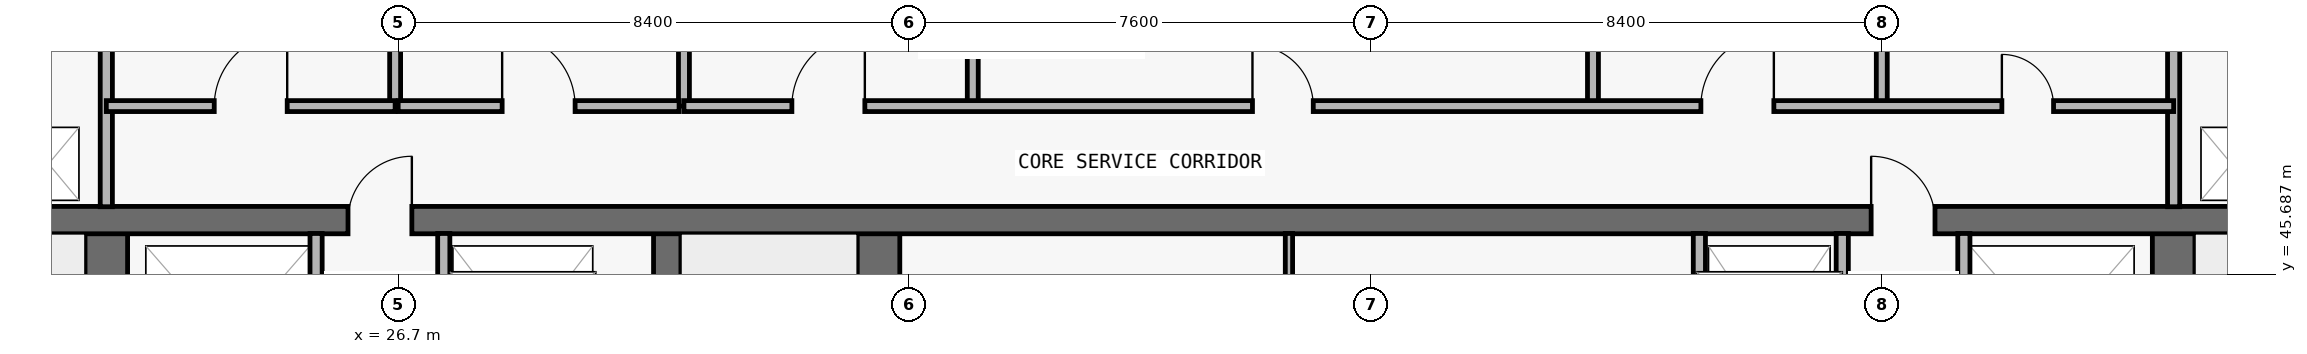
"""IFC4 building model, lengths in metres.
Left out: names, types, materials, properties, quantities, classifications, styles, units other than length and angle.
Written with IfcOpenShell. Run it as: python <this file> out.ifc"""

import sys

from ifc_helpers import new_model, si_unit, direction, frame, frame_2d, origin, place, context, subcontext, project, spatial, rectangle, extrude, element, fill, save


model = new_model("IFC4")
c1 = context("Model", 3, precision=1e-05, world=origin(), true_north=direction((0.0, 1.0)))
c2 = subcontext(c1, "Body", "Model", "MODEL_VIEW")
j1 = project(units=[si_unit("LENGTHUNIT", "METRE"), si_unit("PLANEANGLEUNIT", "RADIAN")], contexts=[c1])
p1 = place(None, origin())
s1 = spatial("IfcSite", under=j1, at=p1, CompositionType="ELEMENT")
p2 = place(p1, origin())
s2 = spatial("IfcBuilding", under=s1, at=p2, CompositionType="ELEMENT")
p3 = place(p2, frame((0.0, 0.0, 188.4)))
s3 = spatial("IfcBuildingStorey", under=s2, at=p3, CompositionType="ELEMENT", Elevation=188.4)
p4 = place(p3, frame((21.9, 37.0, 0.0), z_axis=(0.0, 0.0, 1.0), x_axis=(0.0, 1.0, 0.0)))
e1 = element("IfcWall", 1, at=p4, inside=s3, PredefinedType="SHEAR", context=c2, shape_type="SweptSolid", body=[
    extrude(rectangle(XDim=9.575, YDim=0.7, at=frame_2d((4.788, 0.0))), origin(), (0.0, 0.0, 1.0), 3.05),
])
p5 = place(p4, frame((0.55, 0.0, 0.0)))
e2 = element("IfcOpeningElement", 2, at=p5, cuts=e1, PredefinedType="OPENING", context=c2, shape_type="SweptSolid", body=[
    extrude(rectangle(XDim=1.1, YDim=2.15, at=frame_2d((0.55, 1.075))), frame((0.0, 0.36, 0.0), z_axis=(0.0, -1.0, 0.0), x_axis=(1.0, 0.0, 0.0)), (0.0, 0.0, 1.0), 0.72),
])
p6 = place(p3, frame((55.9, 37.0, 0.0), z_axis=(0.0, 0.0, 1.0), x_axis=(0.0, 1.0, 0.0)))
e3 = element("IfcWall", 3, at=p6, inside=s3, PredefinedType="SHEAR", context=c2, shape_type="SweptSolid", body=[
    extrude(rectangle(XDim=9.575, YDim=0.7, at=frame_2d((4.788, 0.0))), origin(), (0.0, 0.0, 1.0), 3.05),
])
p7 = place(p6, frame((0.55, 0.0, 0.0)))
e4 = element("IfcOpeningElement", 4, at=p7, cuts=e3, PredefinedType="OPENING", context=c2, shape_type="SweptSolid", body=[
    extrude(rectangle(XDim=1.1, YDim=2.15, at=frame_2d((0.55, 1.075))), frame((0.0, 0.36, 0.0), z_axis=(0.0, -1.0, 0.0), x_axis=(1.0, 0.0, 0.0)), (0.0, 0.0, 1.0), 0.72),
])
p8 = place(p3, frame((31.125, 37.0, 0.0), z_axis=(0.0, 0.0, 1.0), x_axis=(0.0, 1.0, 0.0)))
e5 = element("IfcWall", 5, at=p8, inside=s3, PredefinedType="SHEAR", context=c2, shape_type="SweptSolid", body=[
    extrude(rectangle(XDim=9.575, YDim=0.45, at=frame_2d((4.788, 0.0))), origin(), (0.0, 0.0, 1.0), 3.05),
])
p9 = place(p3, frame((34.6, 37.0, 0.0), z_axis=(0.0, 0.0, 1.0), x_axis=(0.0, 1.0, 0.0)))
e6 = element("IfcWall", 6, at=p9, inside=s3, PredefinedType="SHEAR", context=c2, shape_type="SweptSolid", body=[
    extrude(rectangle(XDim=9.575, YDim=0.7, at=frame_2d((4.788, 0.0))), origin(), (0.0, 0.0, 1.0), 3.05),
])
p10 = place(p3, frame((18.3, 46.575, 0.0), z_axis=(0.0, 0.0, 1.0), x_axis=(1.0, 0.0, 0.0)))
e7 = element("IfcWall", 7, at=p10, inside=s3, PredefinedType="SHEAR", context=c2, shape_type="SweptSolid", body=[
    extrude(rectangle(XDim=41.2, YDim=0.45, at=frame_2d((20.6, 0.0))), origin(), (0.0, 0.0, 1.0), 3.05),
])
p11 = place(p10, frame((7.575, 0.0, 0.0)))
e8 = element("IfcOpeningElement", 8, at=p11, cuts=e7, PredefinedType="OPENING", context=c2, shape_type="SweptSolid", body=[
    extrude(rectangle(XDim=1.05, YDim=2.15, at=frame_2d((0.525, 1.075))), frame((0.0, 0.235, 0.0), z_axis=(0.0, -1.0, 0.0), x_axis=(1.0, 0.0, 0.0)), (0.0, 0.0, 1.0), 0.47),
])
p12 = place(p10, frame((32.625, 0.0, 0.0)))
e9 = element("IfcOpeningElement", 9, at=p12, cuts=e7, PredefinedType="OPENING", context=c2, shape_type="SweptSolid", body=[
    extrude(rectangle(XDim=1.05, YDim=2.15, at=frame_2d((0.525, 1.075))), frame((0.0, 0.235, 0.0), z_axis=(0.0, -1.0, 0.0), x_axis=(1.0, 0.0, 0.0)), (0.0, 0.0, 1.0), 0.47),
])
p13 = place(p3, frame((21.9, 46.795, 0.0), z_axis=(0.0, 0.0, 1.0), x_axis=(0.0, 1.0, 0.0)))
e10 = element("IfcWall", 10, at=p13, inside=s3, PredefinedType="PARTITIONING", context=c2, shape_type="SweptSolid", body=[
    extrude(rectangle(XDim=3.16, YDim=0.2, at=frame_2d((1.58, 0.0))), origin(), (0.0, 0.0, 1.0), 3.05),
])
p14 = place(p3, frame((25.35, 43.17, 0.0), z_axis=(0.0, 0.0, 1.0), x_axis=(0.0, 1.0, 0.0)))
e11 = element("IfcWall", 11, at=p14, inside=s3, PredefinedType="PARTITIONING", context=c2, shape_type="SweptSolid", body=[
    extrude(rectangle(XDim=3.185, YDim=0.2, at=frame_2d((1.593, 0.0))), origin(), (0.0, 0.0, 1.0), 3.05),
])
p15 = place(p3, frame((26.65, 48.45, 0.0), z_axis=(0.0, 0.0, 1.0), x_axis=(0.0, 1.0, 0.0)))
e12 = element("IfcWall", 12, at=p15, inside=s3, PredefinedType="PARTITIONING", context=c2, shape_type="SweptSolid", body=[
    extrude(rectangle(XDim=1.505, YDim=0.18, at=frame_2d((0.752, 0.0))), origin(), (0.0, 0.0, 1.0), 3.05),
])
p16 = place(p3, frame((27.45, 43.17, 0.0), z_axis=(0.0, 0.0, 1.0), x_axis=(0.0, 1.0, 0.0)))
e13 = element("IfcWall", 13, at=p16, inside=s3, PredefinedType="PARTITIONING", context=c2, shape_type="SweptSolid", body=[
    extrude(rectangle(XDim=3.185, YDim=0.2, at=frame_2d((1.593, 0.0))), origin(), (0.0, 0.0, 1.0), 3.05),
])
for number, where, z_axis, x_axis in (
    (14, (31.4, 48.45, 0.0), (0.0, 0.0, 1.0), (0.0, 1.0, 0.0)),
    (15, (36.15, 48.45, 0.0), (0.0, 0.0, 1.0), (0.0, 1.0, 0.0)),
):
    element("IfcWall", number, at=place(p3, frame(where, z_axis=z_axis, x_axis=x_axis)), inside=s3, PredefinedType="PARTITIONING", context=c2, shape_type="SweptSolid", body=[
        extrude(rectangle(XDim=1.505, YDim=0.18, at=frame_2d((0.752, 0.0))), origin(), (0.0, 0.0, 1.0), 3.05),
    ])
p17 = place(p3, frame((41.35, 43.17, 0.0), z_axis=(0.0, 0.0, 1.0), x_axis=(0.0, 1.0, 0.0)))
e16 = element("IfcWall", 16, at=p17, inside=s3, PredefinedType="PARTITIONING", context=c2, shape_type="SweptSolid", body=[
    extrude(rectangle(XDim=3.185, YDim=0.12, at=frame_2d((1.593, 0.0))), origin(), (0.0, 0.0, 1.0), 3.05),
])
p18 = place(p3, frame((46.35, 48.45, 0.0), z_axis=(0.0, 0.0, 1.0), x_axis=(0.0, 1.0, 0.0)))
e17 = element("IfcWall", 17, at=p18, inside=s3, PredefinedType="PARTITIONING", context=c2, shape_type="SweptSolid", body=[
    extrude(rectangle(XDim=1.505, YDim=0.18, at=frame_2d((0.752, 0.0))), origin(), (0.0, 0.0, 1.0), 3.05),
])
for number, where, z_axis, x_axis in (
    (18, (48.1, 43.17, 0.0), (0.0, 0.0, 1.0), (0.0, 1.0, 0.0)),
    (19, (50.45, 43.17, 0.0), (0.0, 0.0, 1.0), (0.0, 1.0, 0.0)),
):
    element("IfcWall", number, at=place(p3, frame(where, z_axis=z_axis, x_axis=x_axis)), inside=s3, PredefinedType="PARTITIONING", context=c2, shape_type="SweptSolid", body=[
        extrude(rectangle(XDim=3.185, YDim=0.2, at=frame_2d((1.593, 0.0))), origin(), (0.0, 0.0, 1.0), 3.05),
    ])
p19 = place(p3, frame((51.1, 48.45, 0.0), z_axis=(0.0, 0.0, 1.0), x_axis=(0.0, 1.0, 0.0)))
e20 = element("IfcWall", 20, at=p19, inside=s3, PredefinedType="PARTITIONING", context=c2, shape_type="SweptSolid", body=[
    extrude(rectangle(XDim=1.505, YDim=0.18, at=frame_2d((0.752, 0.0))), origin(), (0.0, 0.0, 1.0), 3.05),
])
p20 = place(p3, frame((52.45, 43.17, 0.0), z_axis=(0.0, 0.0, 1.0), x_axis=(0.0, 1.0, 0.0)))
e21 = element("IfcWall", 21, at=p20, inside=s3, PredefinedType="PARTITIONING", context=c2, shape_type="SweptSolid", body=[
    extrude(rectangle(XDim=3.185, YDim=0.2, at=frame_2d((1.593, 0.0))), origin(), (0.0, 0.0, 1.0), 3.05),
])
p21 = place(p3, frame((55.9, 46.795, 0.0), z_axis=(0.0, 0.0, 1.0), x_axis=(0.0, 1.0, 0.0)))
e22 = element("IfcWall", 22, at=p21, inside=s3, PredefinedType="PARTITIONING", context=c2, shape_type="SweptSolid", body=[
    extrude(rectangle(XDim=3.16, YDim=0.2, at=frame_2d((1.58, 0.0))), origin(), (0.0, 0.0, 1.0), 3.05),
])
p22 = place(p3, frame((21.9, 48.45, 0.0), z_axis=(0.0, 0.0, 1.0), x_axis=(1.0, 0.0, 0.0)))
e23 = element("IfcWall", 23, at=p22, inside=s3, PredefinedType="PARTITIONING", context=c2, shape_type="SweptSolid", body=[
    extrude(rectangle(XDim=4.75, YDim=0.18, at=frame_2d((2.375, 0.0))), origin(), (0.0, 0.0, 1.0), 3.05),
])
p23 = place(p22, frame((1.775, 0.0, 0.0)))
e24 = element("IfcOpeningElement", 24, at=p23, cuts=e23, PredefinedType="OPENING", context=c2, shape_type="SweptSolid", body=[
    extrude(rectangle(XDim=1.2, YDim=2.2, at=frame_2d((0.6, 1.1))), frame((0.0, 0.1, 0.0), z_axis=(0.0, -1.0, 0.0), x_axis=(1.0, 0.0, 0.0)), (0.0, 0.0, 1.0), 0.2),
])
p24 = place(p3, frame((26.7, 48.45, 0.0), z_axis=(0.0, 0.0, 1.0), x_axis=(1.0, 0.0, 0.0)))
e25 = element("IfcWall", 25, at=p24, inside=s3, PredefinedType="PARTITIONING", context=c2, shape_type="SweptSolid", body=[
    extrude(rectangle(XDim=4.62, YDim=0.18, at=frame_2d((2.31, 0.0))), origin(), (0.0, 0.0, 1.0), 3.05),
])
p25 = place(p24, frame((1.71, 0.0, 0.0)))
e26 = element("IfcOpeningElement", 26, at=p25, cuts=e25, PredefinedType="OPENING", context=c2, shape_type="SweptSolid", body=[
    extrude(rectangle(XDim=1.2, YDim=2.2, at=frame_2d((0.6, 1.1))), frame((0.0, 0.1, 0.0), z_axis=(0.0, -1.0, 0.0), x_axis=(1.0, 0.0, 0.0)), (0.0, 0.0, 1.0), 0.2),
])
p26 = place(p3, frame((31.4, 48.45, 0.0), z_axis=(0.0, 0.0, 1.0), x_axis=(1.0, 0.0, 0.0)))
e27 = element("IfcWall", 27, at=p26, inside=s3, PredefinedType="PARTITIONING", context=c2, shape_type="SweptSolid", body=[
    extrude(rectangle(XDim=24.5, YDim=0.18, at=frame_2d((12.25, 0.0))), origin(), (0.0, 0.0, 1.0), 3.05),
])
p27 = place(p26, frame((1.775, 0.0, 0.0)))
e28 = element("IfcOpeningElement", 28, at=p27, cuts=e27, PredefinedType="OPENING", context=c2, shape_type="SweptSolid", body=[
    extrude(rectangle(XDim=1.2, YDim=2.2, at=frame_2d((0.6, 1.1))), frame((0.0, 0.1, 0.0), z_axis=(0.0, -1.0, 0.0), x_axis=(1.0, 0.0, 0.0)), (0.0, 0.0, 1.0), 0.2),
])
p28 = place(p26, frame((9.35, 0.0, 0.0)))
e29 = element("IfcOpeningElement", 29, at=p28, cuts=e27, PredefinedType="OPENING", context=c2, shape_type="SweptSolid", body=[
    extrude(rectangle(XDim=1.0, YDim=2.2, at=frame_2d((0.5, 1.1))), frame((0.0, 0.1, 0.0), z_axis=(0.0, -1.0, 0.0), x_axis=(1.0, 0.0, 0.0)), (0.0, 0.0, 1.0), 0.2),
])
p29 = place(p26, frame((16.725, 0.0, 0.0)))
e30 = element("IfcOpeningElement", 30, at=p29, cuts=e27, PredefinedType="OPENING", context=c2, shape_type="SweptSolid", body=[
    extrude(rectangle(XDim=1.2, YDim=2.2, at=frame_2d((0.6, 1.1))), frame((0.0, 0.1, 0.0), z_axis=(0.0, -1.0, 0.0), x_axis=(1.0, 0.0, 0.0)), (0.0, 0.0, 1.0), 0.2),
])
p30 = place(p26, frame((21.675, 0.0, 0.0)))
e31 = element("IfcOpeningElement", 31, at=p30, cuts=e27, PredefinedType="OPENING", context=c2, shape_type="SweptSolid", body=[
    extrude(rectangle(XDim=0.85, YDim=2.1, at=frame_2d((0.425, 1.05))), frame((0.0, 0.1, 0.0), z_axis=(0.0, -1.0, 0.0), x_axis=(1.0, 0.0, 0.0)), (0.0, 0.0, 1.0), 0.2),
])
p31 = place(p11, origin())
e32 = element("IfcDoor", 32, at=p31, inside=s3, OperationType="SINGLE_SWING_RIGHT", PredefinedType="DOOR", context=c2, shape_type="SweptSolid", body=[
    extrude(rectangle(XDim=1.05, YDim=2.15, at=frame_2d((0.525, 1.075))), frame((0.0, 0.025, 0.0), z_axis=(0.0, -1.0, 0.0), x_axis=(1.0, 0.0, 0.0)), (0.0, 0.0, 1.0), 0.05),
])
fill(e8, e32)
p32 = place(p12, origin())
e33 = element("IfcDoor", 33, at=p32, inside=s3, OperationType="SINGLE_SWING_LEFT", PredefinedType="DOOR", context=c2, shape_type="SweptSolid", body=[
    extrude(rectangle(XDim=1.05, YDim=2.15, at=frame_2d((0.525, 1.075))), frame((0.0, 0.025, 0.0), z_axis=(0.0, -1.0, 0.0), x_axis=(1.0, 0.0, 0.0)), (0.0, 0.0, 1.0), 0.05),
])
fill(e9, e33)
p33 = place(p23, origin())
e34 = element("IfcDoor", 34, at=p33, inside=s3, OperationType="SINGLE_SWING_RIGHT", PredefinedType="DOOR", context=c2, shape_type="SweptSolid", body=[
    extrude(rectangle(XDim=1.2, YDim=2.2, at=frame_2d((0.6, 1.1))), frame((0.0, 0.025, 0.0), z_axis=(0.0, -1.0, 0.0), x_axis=(1.0, 0.0, 0.0)), (0.0, 0.0, 1.0), 0.05),
])
fill(e24, e34)
p34 = place(p25, origin())
e35 = element("IfcDoor", 35, at=p34, inside=s3, OperationType="SINGLE_SWING_LEFT", PredefinedType="DOOR", context=c2, shape_type="SweptSolid", body=[
    extrude(rectangle(XDim=1.2, YDim=2.2, at=frame_2d((0.6, 1.1))), frame((0.0, 0.025, 0.0), z_axis=(0.0, -1.0, 0.0), x_axis=(1.0, 0.0, 0.0)), (0.0, 0.0, 1.0), 0.05),
])
fill(e26, e35)
p35 = place(p27, origin())
e36 = element("IfcDoor", 36, at=p35, inside=s3, OperationType="SINGLE_SWING_RIGHT", PredefinedType="DOOR", context=c2, shape_type="SweptSolid", body=[
    extrude(rectangle(XDim=1.2, YDim=2.2, at=frame_2d((0.6, 1.1))), frame((0.0, 0.025, 0.0), z_axis=(0.0, -1.0, 0.0), x_axis=(1.0, 0.0, 0.0)), (0.0, 0.0, 1.0), 0.05),
])
fill(e28, e36)
p36 = place(p28, origin())
e37 = element("IfcDoor", 37, at=p36, inside=s3, OperationType="SINGLE_SWING_LEFT", PredefinedType="DOOR", context=c2, shape_type="SweptSolid", body=[
    extrude(rectangle(XDim=1.0, YDim=2.2, at=frame_2d((0.5, 1.1))), frame((0.0, 0.025, 0.0), z_axis=(0.0, -1.0, 0.0), x_axis=(1.0, 0.0, 0.0)), (0.0, 0.0, 1.0), 0.05),
])
fill(e29, e37)
p37 = place(p29, origin())
e38 = element("IfcDoor", 38, at=p37, inside=s3, OperationType="SINGLE_SWING_RIGHT", PredefinedType="DOOR", context=c2, shape_type="SweptSolid", body=[
    extrude(rectangle(XDim=1.2, YDim=2.2, at=frame_2d((0.6, 1.1))), frame((0.0, 0.025, 0.0), z_axis=(0.0, -1.0, 0.0), x_axis=(1.0, 0.0, 0.0)), (0.0, 0.0, 1.0), 0.05),
])
fill(e30, e38)
p38 = place(p30, origin())
e39 = element("IfcDoor", 39, at=p38, inside=s3, OperationType="SINGLE_SWING_LEFT", PredefinedType="DOOR", context=c2, shape_type="SweptSolid", body=[
    extrude(rectangle(XDim=0.85, YDim=2.1, at=frame_2d((0.425, 1.05))), frame((0.0, 0.025, 0.0), z_axis=(0.0, -1.0, 0.0), x_axis=(1.0, 0.0, 0.0)), (0.0, 0.0, 1.0), 0.05),
])
fill(e31, e39)
save(model, sys.argv[1])
